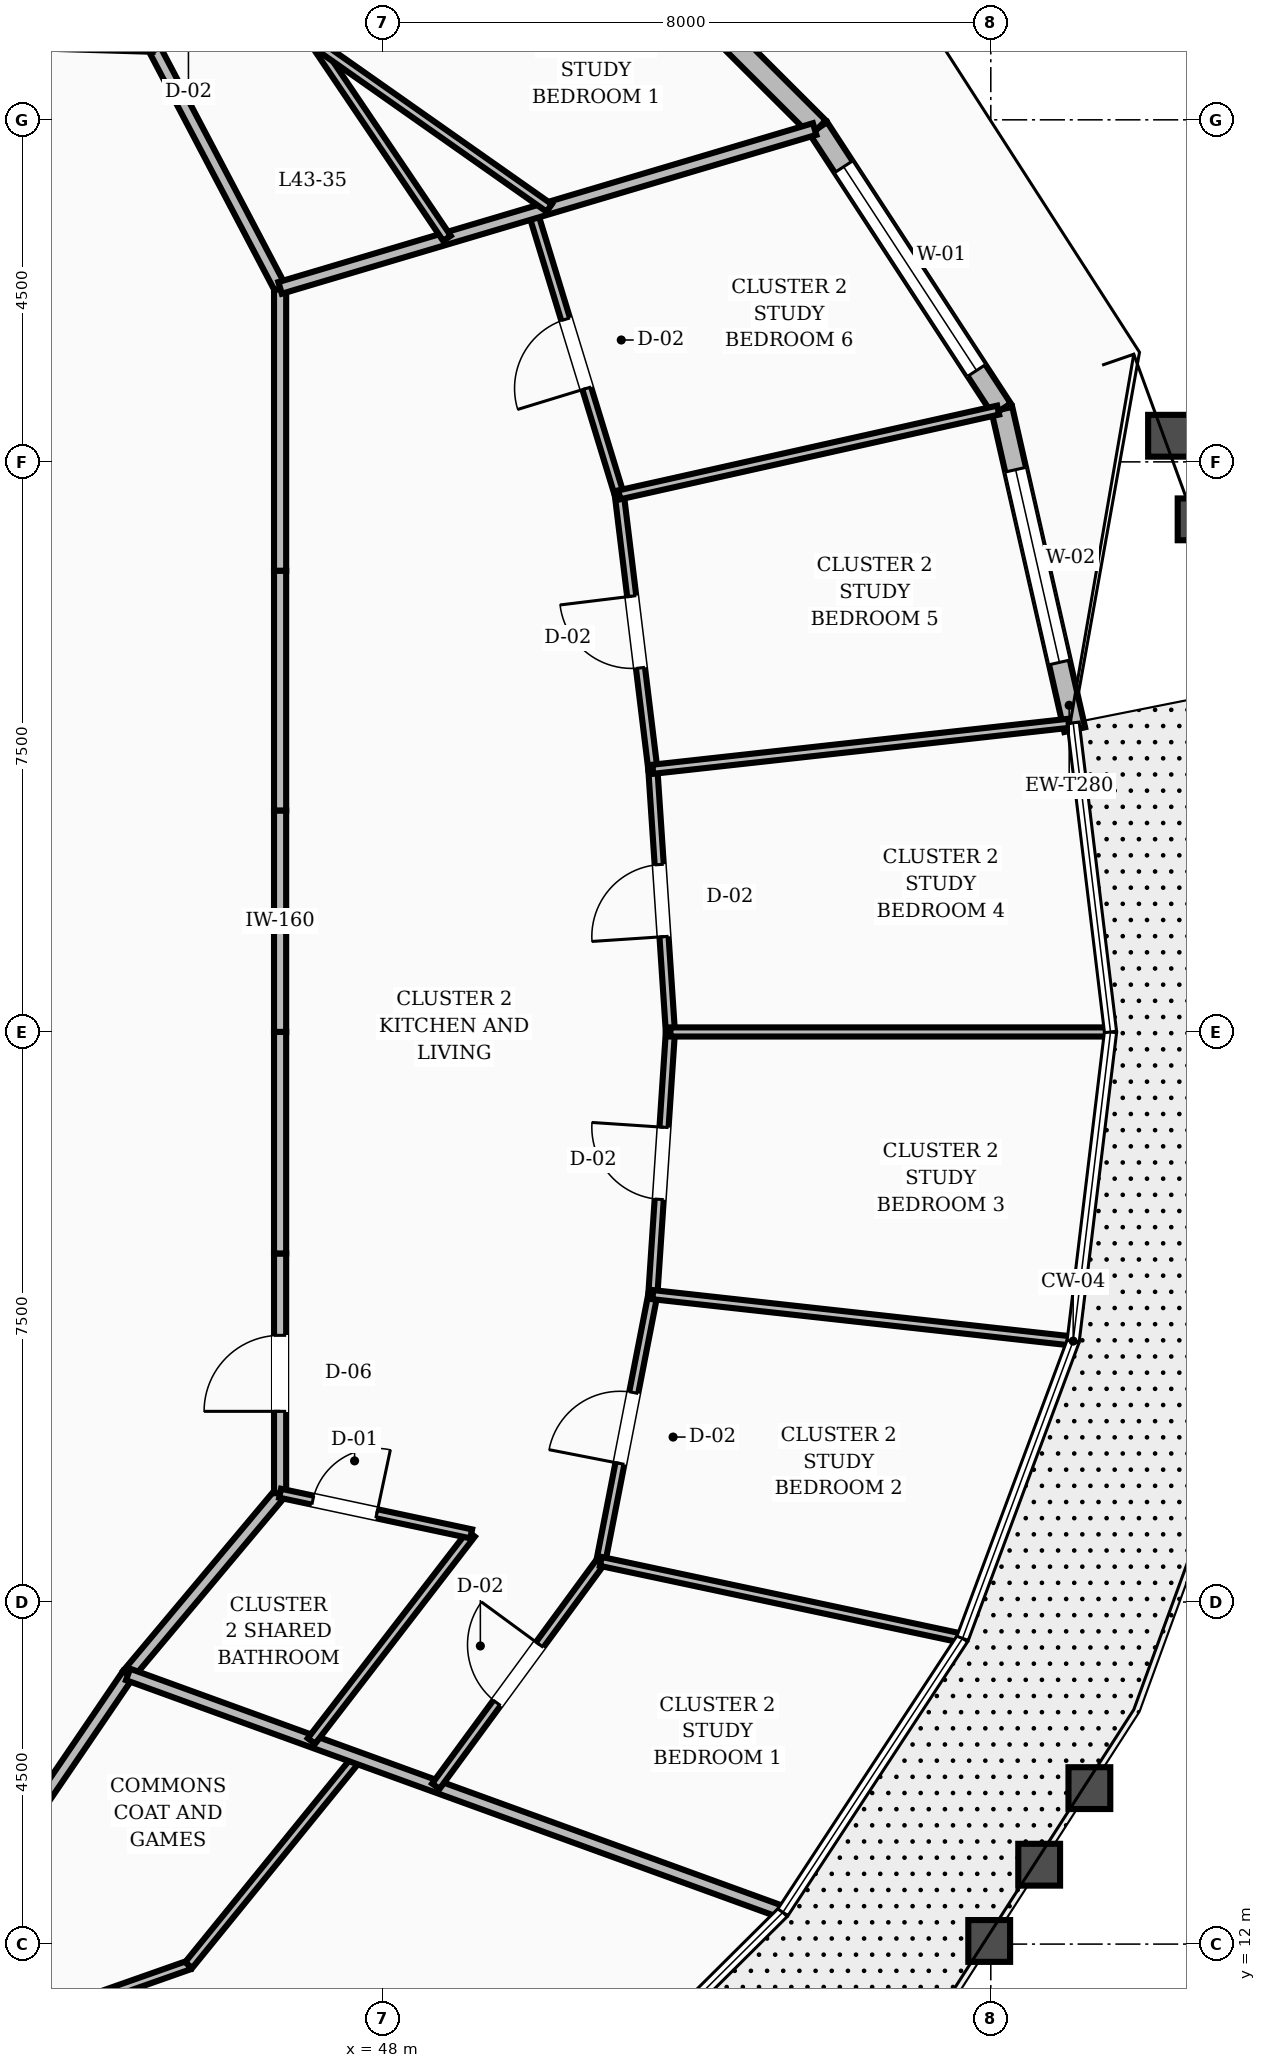
"""IFC4 building model, lengths in metres.
Left out: names, types, materials, properties, quantities, classifications, styles, units other than length and angle.
Written with IfcOpenShell. Run it as: python <this file> out.ifc"""

import sys

from ifc_helpers import new_model, si_unit, direction, frame, frame_2d, origin, place, context, subcontext, project, spatial, rectangle, extrude, element, fill, save


model = new_model("IFC4")
c1 = context("Model", 3, precision=1e-05, world=origin(), true_north=direction((0.0, 1.0)))
c2 = subcontext(c1, "Body", "Model", "MODEL_VIEW")
j1 = project(units=[si_unit("LENGTHUNIT", "METRE"), si_unit("PLANEANGLEUNIT", "RADIAN")], contexts=[c1])
p1 = place(None, origin())
s1 = spatial("IfcSite", under=j1, at=p1, CompositionType="ELEMENT")
p2 = place(p1, origin())
s2 = spatial("IfcBuilding", under=s1, at=p2, CompositionType="ELEMENT")
p3 = place(p2, frame((0.0, 0.0, 167.6)))
s3 = spatial("IfcBuildingStorey", under=s2, at=p3, CompositionType="ELEMENT", Elevation=167.6)
p4 = place(p3, frame((57.104, 27.977, 0.0), z_axis=(0.0, 0.0, 1.0), x_axis=(-0.221760260936, 0.975101218679, 0.0)))
e1 = element("IfcWall", 1, at=p4, inside=s3, PredefinedType="STANDARD", context=c2, shape_type="SweptSolid", body=[
    extrude(rectangle(XDim=4.322, YDim=0.28, at=frame_2d((2.161, 0.0))), origin(), (0.0, 0.0, 1.0), 2.82),
])
p5 = place(p4, frame((0.907, 0.0, 0.8)))
e2 = element("IfcOpeningElement", 2, at=p5, cuts=e1, PredefinedType="OPENING", context=c2, shape_type="SweptSolid", body=[
    extrude(rectangle(XDim=2.6, YDim=1.65, at=frame_2d((1.3, 0.825))), frame((0.0, 0.15, 0.0), z_axis=(0.0, -1.0, 0.0), x_axis=(1.0, 0.0, 0.0)), (0.0, 0.0, 1.0), 0.3),
])
p6 = place(p3, frame((56.146, 32.192, 0.0), z_axis=(0.0, 0.0, 1.0), x_axis=(-0.546488523779, 0.837466592395, 0.0)))
e3 = element("IfcWall", 3, at=p6, inside=s3, PredefinedType="STANDARD", context=c2, shape_type="SweptSolid", body=[
    extrude(rectangle(XDim=4.419, YDim=0.28, at=frame_2d((2.209, 0.0))), origin(), (0.0, 0.0, 1.0), 2.82),
])
p7 = place(p6, frame((0.61, 0.0, 0.8)))
e4 = element("IfcOpeningElement", 4, at=p7, cuts=e3, PredefinedType="OPENING", context=c2, shape_type="SweptSolid", body=[
    extrude(rectangle(XDim=3.2, YDim=1.65, at=frame_2d((1.6, 0.825))), frame((0.0, 0.15, 0.0), z_axis=(0.0, -1.0, 0.0), x_axis=(1.0, 0.0, 0.0)), (0.0, 0.0, 1.0), 0.3),
])
p8 = place(p3, frame((53.731, 35.893, 0.0), z_axis=(0.0, 0.0, 1.0), x_axis=(-0.707797600077, 0.706415286729, 0.0)))
e5 = element("IfcWall", 5, at=p8, inside=s3, PredefinedType="STANDARD", context=c2, shape_type="SweptSolid", body=[
    extrude(rectangle(XDim=4.592, YDim=0.28, at=frame_2d((2.296, 0.0))), origin(), (0.0, 0.0, 1.0), 2.82),
])
p9 = place(p3, frame((46.65, 24.0, 0.0), z_axis=(0.0, 0.0, 1.0), x_axis=(0.0, 1.0, 0.0)))
e6 = element("IfcWall", 6, at=p9, inside=s3, PredefinedType="SOLIDWALL", context=c2, shape_type="SweptSolid", body=[
    extrude(rectangle(XDim=2.914, YDim=0.16, at=frame_2d((1.457, 0.0))), origin(), (0.0, 0.0, 1.0), 2.8),
])
p10 = place(p3, frame((46.65, 26.914, 0.0), z_axis=(0.0, 0.0, 1.0), x_axis=(0.0, 1.0, 0.0)))
e7 = element("IfcWall", 7, at=p10, inside=s3, PredefinedType="SOLIDWALL", context=c2, shape_type="SweptSolid", body=[
    extrude(rectangle(XDim=3.154, YDim=0.16, at=frame_2d((1.577, 0.0))), origin(), (0.0, 0.0, 1.0), 2.8),
])
p11 = place(p3, frame((46.65, 30.068, 0.0), z_axis=(0.0, 0.0, 1.0), x_axis=(0.0, 1.0, 0.0)))
e8 = element("IfcWall", 8, at=p11, inside=s3, PredefinedType="SOLIDWALL", context=c2, shape_type="SweptSolid", body=[
    extrude(rectangle(XDim=3.721, YDim=0.16, at=frame_2d((1.86, 0.0))), origin(), (0.0, 0.0, 1.0), 2.8),
])
p12 = place(p3, frame((46.65, 33.789, 0.0), z_axis=(0.0, 0.0, 1.0), x_axis=(-0.46527115782, 0.885168204185, 0.0)))
e9 = element("IfcWall", 9, at=p12, inside=s3, PredefinedType="SOLIDWALL", context=c2, shape_type="SweptSolid", body=[
    extrude(rectangle(XDim=3.6, YDim=0.16, at=frame_2d((1.8, 0.0))), origin(), (0.0, 0.0, 1.0), 2.8),
])
p13 = place(p3, frame((42.95, 13.05, 0.0), z_axis=(0.0, 0.0, 1.0), x_axis=(0.562674669208, 0.826678423955, 0.0)))
e10 = element("IfcWall", 10, at=p13, inside=s3, PredefinedType="SOLIDWALL", context=c2, shape_type="SweptSolid", body=[
    extrude(rectangle(XDim=3.021, YDim=0.16, at=frame_2d((1.511, 0.0))), origin(), (0.0, 0.0, 1.0), 2.8),
])
p14 = place(p3, frame((44.65, 15.548, 0.0), z_axis=(0.0, 0.0, 1.0), x_axis=(0.642665742791, 0.76614668507, 0.0)))
e11 = element("IfcWall", 11, at=p14, inside=s3, PredefinedType="SOLIDWALL", context=c2, shape_type="SweptSolid", body=[
    extrude(rectangle(XDim=3.112, YDim=0.16, at=frame_2d((1.556, 0.0))), origin(), (0.0, 0.0, 1.0), 2.8),
])
p15 = place(p3, frame((46.65, 17.932, 0.0), z_axis=(0.0, 0.0, 1.0), x_axis=(0.0, 1.0, 0.0)))
e12 = element("IfcWall", 12, at=p15, inside=s3, PredefinedType="SOLIDWALL", context=c2, shape_type="SweptSolid", body=[
    extrude(rectangle(XDim=3.154, YDim=0.16, at=frame_2d((1.577, 0.0))), origin(), (0.0, 0.0, 1.0), 2.8),
])
p16 = place(p15, frame((1.077, 0.0, 0.0)))
e13 = element("IfcOpeningElement", 13, at=p16, cuts=e12, PredefinedType="OPENING", context=c2, shape_type="SweptSolid", body=[
    extrude(rectangle(XDim=1.0, YDim=2.1, at=frame_2d((0.5, 1.05))), frame((0.0, 0.09, 0.0), z_axis=(0.0, -1.0, 0.0), x_axis=(1.0, 0.0, 0.0)), (0.0, 0.0, 1.0), 0.18),
])
p17 = place(p3, frame((46.65, 21.086, 0.0), z_axis=(0.0, 0.0, 1.0), x_axis=(0.0, 1.0, 0.0)))
e14 = element("IfcWall", 14, at=p17, inside=s3, PredefinedType="SOLIDWALL", context=c2, shape_type="SweptSolid", body=[
    extrude(rectangle(XDim=2.914, YDim=0.16, at=frame_2d((1.457, 0.0))), origin(), (0.0, 0.0, 1.0), 2.8),
])
p18 = place(p3, frame((41.946, 10.491, 0.0), z_axis=(0.0, 0.0, 1.0), x_axis=(0.943262037543, 0.332049286298, 0.0)))
e15 = element("IfcWall", 15, at=p18, inside=s3, PredefinedType="PARTITIONING", context=c2, shape_type="SweptSolid", body=[
    extrude(rectangle(XDim=3.712, YDim=0.12, at=frame_2d((1.856, 0.0))), origin(), (0.0, 0.0, 1.0), 2.8),
])
p19 = place(p3, frame((45.447, 11.723, 0.0), z_axis=(0.0, 0.0, 1.0), x_axis=(0.630754646961, 0.775982329268, 0.0)))
e16 = element("IfcWall", 16, at=p19, inside=s3, PredefinedType="PARTITIONING", context=c2, shape_type="SweptSolid", body=[
    extrude(rectangle(XDim=3.517, YDim=0.12, at=frame_2d((1.758, 0.0))), origin(), (0.0, 0.0, 1.0), 2.8),
])
p20 = place(p3, frame((44.65, 15.548, 0.0), z_axis=(0.0, 0.0, 1.0), x_axis=(0.93991222373, -0.341416185443, 0.0)))
e17 = element("IfcWall", 17, at=p20, inside=s3, PredefinedType="SOLIDWALL", context=c2, shape_type="SweptSolid", body=[
    extrude(rectangle(XDim=9.116, YDim=0.16, at=frame_2d((4.558, 0.0))), origin(), (0.0, 0.0, 1.0), 2.8),
])
p21 = place(p3, frame((47.062, 14.671, 0.0), z_axis=(0.0, 0.0, 1.0), x_axis=(0.610625572527, 0.791919446772, 0.0)))
e18 = element("IfcWall", 18, at=p21, inside=s3, PredefinedType="PARTITIONING", context=c2, shape_type="SweptSolid", body=[
    extrude(rectangle(XDim=3.442, YDim=0.12, at=frame_2d((1.721, 0.0))), origin(), (0.0, 0.0, 1.0), 2.8),
])
p22 = place(p3, frame((46.65, 17.932, 0.0), z_axis=(0.0, 0.0, 1.0), x_axis=(0.978126492025, -0.208010974707, 0.0)))
e19 = element("IfcWall", 19, at=p22, inside=s3, PredefinedType="PARTITIONING", context=c2, shape_type="SweptSolid", body=[
    extrude(rectangle(XDim=2.57, YDim=0.12, at=frame_2d((1.285, 0.0))), origin(), (0.0, 0.0, 1.0), 2.8),
])
p23 = place(p22, frame((0.44, 0.0, 0.0)))
e20 = element("IfcOpeningElement", 20, at=p23, cuts=e19, PredefinedType="OPENING", context=c2, shape_type="SweptSolid", body=[
    extrude(rectangle(XDim=0.86, YDim=2.1, at=frame_2d((0.43, 1.05))), frame((0.0, 0.07, 0.0), z_axis=(0.0, -1.0, 0.0), x_axis=(1.0, 0.0, 0.0)), (0.0, 0.0, 1.0), 0.14),
])
p24 = place(p3, frame((48.699, 14.077, 0.0), z_axis=(0.0, 0.0, 1.0), x_axis=(0.591727106309, 0.806138345235, 0.0)))
e21 = element("IfcWall", 21, at=p24, inside=s3, PredefinedType="PARTITIONING", context=c2, shape_type="SweptSolid", body=[
    extrude(rectangle(XDim=3.669, YDim=0.12, at=frame_2d((1.834, 0.0))), origin(), (0.0, 0.0, 1.0), 2.8),
])
p25 = place(p24, frame((1.359, 0.0, 0.0)))
e22 = element("IfcOpeningElement", 22, at=p25, cuts=e21, PredefinedType="OPENING", context=c2, shape_type="SweptSolid", body=[
    extrude(rectangle(XDim=0.95, YDim=2.1, at=frame_2d((0.475, 1.05))), frame((0.0, 0.07, 0.0), z_axis=(0.0, -1.0, 0.0), x_axis=(1.0, 0.0, 0.0)), (0.0, 0.0, 1.0), 0.14),
])
p26 = place(p3, frame((50.87, 17.034, 0.0), z_axis=(0.0, 0.0, 1.0), x_axis=(0.191308228285, 0.981530010642, 0.0)))
e23 = element("IfcWall", 23, at=p26, inside=s3, PredefinedType="PARTITIONING", context=c2, shape_type="SweptSolid", body=[
    extrude(rectangle(XDim=3.576, YDim=0.12, at=frame_2d((1.788, 0.0))), origin(), (0.0, 0.0, 1.0), 2.8),
])
p27 = place(p26, frame((1.313, 0.0, 0.0)))
e24 = element("IfcOpeningElement", 24, at=p27, cuts=e23, PredefinedType="OPENING", context=c2, shape_type="SweptSolid", body=[
    extrude(rectangle(XDim=0.95, YDim=2.1, at=frame_2d((0.475, 1.05))), frame((0.0, 0.07, 0.0), z_axis=(0.0, -1.0, 0.0), x_axis=(1.0, 0.0, 0.0)), (0.0, 0.0, 1.0), 0.14),
])
p28 = place(p3, frame((50.87, 17.034, 0.0), z_axis=(0.0, 0.0, 1.0), x_axis=(0.978131394448, -0.207987920793, 0.0)))
e25 = element("IfcWall", 25, at=p28, inside=s3, PredefinedType="PARTITIONING", context=c2, shape_type="SweptSolid", body=[
    extrude(rectangle(XDim=4.815, YDim=0.12, at=frame_2d((2.407, 0.0))), origin(), (0.0, 0.0, 1.0), 2.8),
])
p29 = place(p3, frame((51.554, 20.544, 0.0), z_axis=(0.0, 0.0, 1.0), x_axis=(0.066678066977, 0.997774541359, 0.0)))
e26 = element("IfcWall", 26, at=p29, inside=s3, PredefinedType="PARTITIONING", context=c2, shape_type="SweptSolid", body=[
    extrude(rectangle(XDim=3.464, YDim=0.12, at=frame_2d((1.732, 0.0))), origin(), (0.0, 0.0, 1.0), 2.8),
])
p30 = place(p29, frame((1.257, 0.0, 0.0)))
e27 = element("IfcOpeningElement", 27, at=p30, cuts=e26, PredefinedType="OPENING", context=c2, shape_type="SweptSolid", body=[
    extrude(rectangle(XDim=0.95, YDim=2.1, at=frame_2d((0.475, 1.05))), frame((0.0, 0.07, 0.0), z_axis=(0.0, -1.0, 0.0), x_axis=(1.0, 0.0, 0.0)), (0.0, 0.0, 1.0), 0.14),
])
p31 = place(p3, frame((51.554, 20.544, 0.0), z_axis=(0.0, 0.0, 1.0), x_axis=(0.99395212295, -0.109814285424, 0.0)))
e28 = element("IfcWall", 28, at=p31, inside=s3, PredefinedType="PARTITIONING", context=c2, shape_type="SweptSolid", body=[
    extrude(rectangle(XDim=5.514, YDim=0.12, at=frame_2d((2.757, 0.0))), origin(), (0.0, 0.0, 1.0), 2.8),
])
p32 = place(p3, frame((51.785, 24.0, 0.0), z_axis=(0.0, 0.0, 1.0), x_axis=(-0.066678066977, 0.997774541359, 0.0)))
e29 = element("IfcWall", 29, at=p32, inside=s3, PredefinedType="PARTITIONING", context=c2, shape_type="SweptSolid", body=[
    extrude(rectangle(XDim=3.464, YDim=0.12, at=frame_2d((1.732, 0.0))), origin(), (0.0, 0.0, 1.0), 2.8),
])
p33 = place(p32, frame((1.257, 0.0, 0.0)))
e30 = element("IfcOpeningElement", 30, at=p33, cuts=e29, PredefinedType="OPENING", context=c2, shape_type="SweptSolid", body=[
    extrude(rectangle(XDim=0.95, YDim=2.1, at=frame_2d((0.475, 1.05))), frame((0.0, 0.07, 0.0), z_axis=(0.0, -1.0, 0.0), x_axis=(1.0, 0.0, 0.0)), (0.0, 0.0, 1.0), 0.14),
])
p34 = place(p3, frame((51.785, 24.0, 0.0), z_axis=(0.0, 0.0, 1.0), x_axis=(1.0, 0.0, 0.0)))
e31 = element("IfcWall", 31, at=p34, inside=s3, PredefinedType="PARTITIONING", context=c2, shape_type="SweptSolid", body=[
    extrude(rectangle(XDim=5.74, YDim=0.12, at=frame_2d((2.87, 0.0))), origin(), (0.0, 0.0, 1.0), 2.8),
])
p35 = place(p3, frame((51.554, 27.456, 0.0), z_axis=(0.0, 0.0, 1.0), x_axis=(-0.121225369718, 0.992625009627, 0.0)))
e32 = element("IfcWall", 32, at=p35, inside=s3, PredefinedType="PARTITIONING", context=c2, shape_type="SweptSolid", body=[
    extrude(rectangle(XDim=3.637, YDim=0.12, at=frame_2d((1.819, 0.0))), origin(), (0.0, 0.0, 1.0), 2.8),
])
p36 = place(p35, frame((1.344, 0.0, 0.0)))
e33 = element("IfcOpeningElement", 33, at=p36, cuts=e32, PredefinedType="OPENING", context=c2, shape_type="SweptSolid", body=[
    extrude(rectangle(XDim=0.95, YDim=2.1, at=frame_2d((0.475, 1.05))), frame((0.0, 0.07, 0.0), z_axis=(0.0, -1.0, 0.0), x_axis=(1.0, 0.0, 0.0)), (0.0, 0.0, 1.0), 0.14),
])
p37 = place(p3, frame((51.554, 27.456, 0.0), z_axis=(0.0, 0.0, 1.0), x_axis=(0.99395212295, 0.109814285424, 0.0)))
e34 = element("IfcWall", 34, at=p37, inside=s3, PredefinedType="PARTITIONING", context=c2, shape_type="SweptSolid", body=[
    extrude(rectangle(XDim=5.514, YDim=0.12, at=frame_2d((2.757, 0.0))), origin(), (0.0, 0.0, 1.0), 2.8),
])
p38 = place(p3, frame((51.113, 31.066, 0.0), z_axis=(0.0, 0.0, 1.0), x_axis=(-0.292520584303, 0.956259226235, 0.0)))
e35 = element("IfcWall", 35, at=p38, inside=s3, PredefinedType="PARTITIONING", context=c2, shape_type="SweptSolid", body=[
    extrude(rectangle(XDim=3.881, YDim=0.12, at=frame_2d((1.94, 0.0))), origin(), (0.0, 0.0, 1.0), 2.8),
])
p39 = place(p38, frame((1.466, 0.0, 0.0)))
e36 = element("IfcOpeningElement", 36, at=p39, cuts=e35, PredefinedType="OPENING", context=c2, shape_type="SweptSolid", body=[
    extrude(rectangle(XDim=0.95, YDim=2.1, at=frame_2d((0.475, 1.05))), frame((0.0, 0.07, 0.0), z_axis=(0.0, -1.0, 0.0), x_axis=(1.0, 0.0, 0.0)), (0.0, 0.0, 1.0), 0.14),
])
p40 = place(p3, frame((51.113, 31.066, 0.0), z_axis=(0.0, 0.0, 1.0), x_axis=(0.975886929938, 0.218276659258, 0.0)))
e37 = element("IfcWall", 37, at=p40, inside=s3, PredefinedType="PARTITIONING", context=c2, shape_type="SweptSolid", body=[
    extrude(rectangle(XDim=5.107, YDim=0.12, at=frame_2d((2.553, 0.0))), origin(), (0.0, 0.0, 1.0), 2.8),
])
p41 = place(p3, frame((46.65, 33.789, 0.0), z_axis=(0.0, 0.0, 1.0), x_axis=(0.95857221619, 0.284849620586, 0.0)))
e38 = element("IfcWall", 38, at=p41, inside=s3, PredefinedType="SOLIDWALL", context=c2, shape_type="SweptSolid", body=[
    extrude(rectangle(XDim=7.337, YDim=0.16, at=frame_2d((3.668, 0.0))), origin(), (0.0, 0.0, 1.0), 2.8),
])
p42 = place(p3, frame((48.845, 34.441, 0.0), z_axis=(0.0, 0.0, 1.0), x_axis=(-0.559572632914, 0.828781315242, 0.0)))
e39 = element("IfcWall", 39, at=p42, inside=s3, PredefinedType="PARTITIONING", context=c2, shape_type="SweptSolid", body=[
    extrude(rectangle(XDim=3.866, YDim=0.12, at=frame_2d((1.933, 0.0))), origin(), (0.0, 0.0, 1.0), 2.8),
])
p43 = place(p3, frame((50.19, 34.841, 0.0), z_axis=(0.0, 0.0, 1.0), x_axis=(-0.81799600151, 0.575223905547, 0.0)))
e40 = element("IfcWall", 40, at=p43, inside=s3, PredefinedType="PARTITIONING", context=c2, shape_type="SweptSolid", body=[
    extrude(rectangle(XDim=8.012, YDim=0.12, at=frame_2d((4.006, 0.0))), origin(), (0.0, 0.0, 1.0), 2.8),
])
p44 = place(p43, frame((4.891, 0.0, 0.0)))
e41 = element("IfcOpeningElement", 41, at=p44, cuts=e40, PredefinedType="OPENING", context=c2, shape_type="SweptSolid", body=[
    extrude(rectangle(XDim=0.95, YDim=2.1, at=frame_2d((0.475, 1.05))), frame((0.0, 0.07, 0.0), z_axis=(0.0, -1.0, 0.0), x_axis=(1.0, 0.0, 0.0)), (0.0, 0.0, 1.0), 0.14),
])
p45 = place(p5, origin())
e42 = element("IfcWindow", 42, at=p45, inside=s3, PartitioningType="SINGLE_PANEL", PredefinedType="WINDOW", context=c2, shape_type="SweptSolid", body=[
    extrude(rectangle(XDim=2.6, YDim=1.65, at=frame_2d((1.3, 0.825))), frame((0.0, 0.03, 0.0), z_axis=(0.0, -1.0, 0.0), x_axis=(1.0, 0.0, 0.0)), (0.0, 0.0, 1.0), 0.06),
])
fill(e2, e42)
p46 = place(p7, origin())
e43 = element("IfcWindow", 43, at=p46, inside=s3, PartitioningType="SINGLE_PANEL", PredefinedType="WINDOW", context=c2, shape_type="SweptSolid", body=[
    extrude(rectangle(XDim=3.2, YDim=1.65, at=frame_2d((1.6, 0.825))), frame((0.0, 0.03, 0.0), z_axis=(0.0, -1.0, 0.0), x_axis=(1.0, 0.0, 0.0)), (0.0, 0.0, 1.0), 0.06),
])
fill(e4, e43)
p47 = place(p23, origin())
e44 = element("IfcDoor", 44, at=p47, inside=s3, OperationType="SINGLE_SWING_RIGHT", PredefinedType="DOOR", context=c2, shape_type="SweptSolid", body=[
    extrude(rectangle(XDim=0.86, YDim=2.1, at=frame_2d((0.43, 1.05))), frame((0.0, 0.025, 0.0), z_axis=(0.0, -1.0, 0.0), x_axis=(1.0, 0.0, 0.0)), (0.0, 0.0, 1.0), 0.05),
])
fill(e20, e44)
p48 = place(p16, origin())
e45 = element("IfcDoor", 45, at=p48, inside=s3, OperationType="SINGLE_SWING_LEFT", PredefinedType="DOOR", context=c2, shape_type="SweptSolid", body=[
    extrude(rectangle(XDim=1.0, YDim=2.1, at=frame_2d((0.5, 1.05))), frame((0.0, 0.025, 0.0), z_axis=(0.0, -1.0, 0.0), x_axis=(1.0, 0.0, 0.0)), (0.0, 0.0, 1.0), 0.05),
])
fill(e13, e45)
p49 = place(p25, origin())
e46 = element("IfcDoor", 46, at=p49, inside=s3, OperationType="SINGLE_SWING_RIGHT", PredefinedType="DOOR", context=c2, shape_type="SweptSolid", body=[
    extrude(rectangle(XDim=0.95, YDim=2.1, at=frame_2d((0.475, 1.05))), frame((0.0, 0.025, 0.0), z_axis=(0.0, -1.0, 0.0), x_axis=(1.0, 0.0, 0.0)), (0.0, 0.0, 1.0), 0.05),
])
fill(e22, e46)
p50 = place(p27, origin())
e47 = element("IfcDoor", 47, at=p50, inside=s3, OperationType="SINGLE_SWING_LEFT", PredefinedType="DOOR", context=c2, shape_type="SweptSolid", body=[
    extrude(rectangle(XDim=0.95, YDim=2.1, at=frame_2d((0.475, 1.05))), frame((0.0, 0.025, 0.0), z_axis=(0.0, -1.0, 0.0), x_axis=(1.0, 0.0, 0.0)), (0.0, 0.0, 1.0), 0.05),
])
fill(e24, e47)
p51 = place(p30, origin())
e48 = element("IfcDoor", 48, at=p51, inside=s3, OperationType="SINGLE_SWING_RIGHT", PredefinedType="DOOR", context=c2, shape_type="SweptSolid", body=[
    extrude(rectangle(XDim=0.95, YDim=2.1, at=frame_2d((0.475, 1.05))), frame((0.0, 0.025, 0.0), z_axis=(0.0, -1.0, 0.0), x_axis=(1.0, 0.0, 0.0)), (0.0, 0.0, 1.0), 0.05),
])
fill(e27, e48)
p52 = place(p33, origin())
e49 = element("IfcDoor", 49, at=p52, inside=s3, OperationType="SINGLE_SWING_LEFT", PredefinedType="DOOR", context=c2, shape_type="SweptSolid", body=[
    extrude(rectangle(XDim=0.95, YDim=2.1, at=frame_2d((0.475, 1.05))), frame((0.0, 0.025, 0.0), z_axis=(0.0, -1.0, 0.0), x_axis=(1.0, 0.0, 0.0)), (0.0, 0.0, 1.0), 0.05),
])
fill(e30, e49)
p53 = place(p36, origin())
e50 = element("IfcDoor", 50, at=p53, inside=s3, OperationType="SINGLE_SWING_RIGHT", PredefinedType="DOOR", context=c2, shape_type="SweptSolid", body=[
    extrude(rectangle(XDim=0.95, YDim=2.1, at=frame_2d((0.475, 1.05))), frame((0.0, 0.025, 0.0), z_axis=(0.0, -1.0, 0.0), x_axis=(1.0, 0.0, 0.0)), (0.0, 0.0, 1.0), 0.05),
])
fill(e33, e50)
p54 = place(p39, origin())
e51 = element("IfcDoor", 51, at=p54, inside=s3, OperationType="SINGLE_SWING_LEFT", PredefinedType="DOOR", context=c2, shape_type="SweptSolid", body=[
    extrude(rectangle(XDim=0.95, YDim=2.1, at=frame_2d((0.475, 1.05))), frame((0.0, 0.025, 0.0), z_axis=(0.0, -1.0, 0.0), x_axis=(1.0, 0.0, 0.0)), (0.0, 0.0, 1.0), 0.05),
])
fill(e36, e51)
save(model, sys.argv[1])
